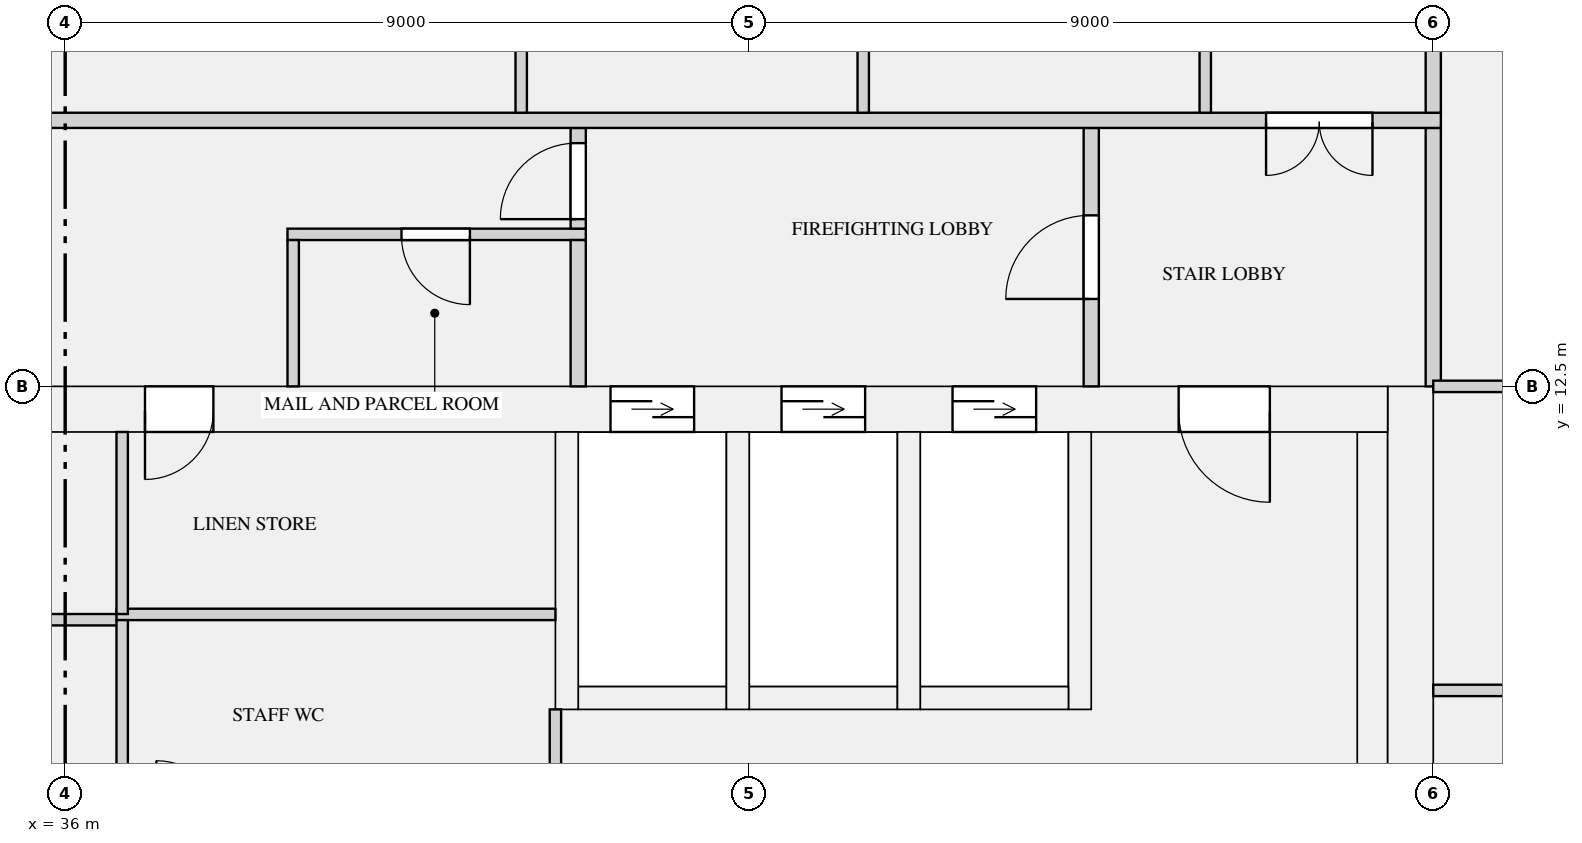
"""IFC4 building model, lengths in metres.
Left out: names, types, materials, properties, quantities, classifications, styles, units other than length and angle.
Written with IfcOpenShell. Run it as: python <this file> out.ifc"""

import sys

from ifc_helpers import new_model, si_unit, direction, frame, frame_2d, origin, place, context, subcontext, project, spatial, rectangle, extrude, element, fill, save


model = new_model("IFC4")
c1 = context("Model", 3, precision=1e-05, world=origin(), true_north=direction((0.0, 1.0)))
c2 = subcontext(c1, "Body", "Model", "MODEL_VIEW")
j1 = project(units=[si_unit("LENGTHUNIT", "METRE"), si_unit("PLANEANGLEUNIT", "RADIAN")], contexts=[c1])
p1 = place(None, origin())
s1 = spatial("IfcSite", under=j1, at=p1, CompositionType="ELEMENT")
p2 = place(p1, origin())
s2 = spatial("IfcBuilding", under=s1, at=p2, CompositionType="ELEMENT")
p3 = place(p2, frame((0.0, 0.0, 229.5)))
s3 = spatial("IfcBuildingStorey", under=s2, at=p3, CompositionType="ELEMENT", Elevation=229.5)
p4 = place(p3, frame((53.7, 0.0, 0.0), z_axis=(0.0, 0.0, 1.0), x_axis=(0.0, 1.0, 0.0)))
e1 = element("IfcWall", 1, at=p4, inside=s3, PredefinedType="SHEAR", context=c2, shape_type="SweptSolid", body=[
    extrude(rectangle(XDim=12.5, YDim=0.6, at=frame_2d((6.25, 0.0))), origin(), (0.0, 0.0, 1.0), 3.15),
])
p5 = place(p3, frame((18.6, 12.2, 0.0), z_axis=(0.0, 0.0, 1.0), x_axis=(1.0, 0.0, 0.0)))
e2 = element("IfcWall", 2, at=p5, inside=s3, PredefinedType="SHEAR", context=c2, shape_type="SweptSolid", body=[
    extrude(rectangle(XDim=34.8, YDim=0.6, at=frame_2d((17.4, 0.0))), origin(), (0.0, 0.0, 1.0), 3.15),
])
p6 = place(p5, frame((24.575, 0.0, 0.0)))
e3 = element("IfcOpeningElement", 3, at=p6, cuts=e2, PredefinedType="OPENING", context=c2, shape_type="SweptSolid", body=[
    extrude(rectangle(XDim=1.1, YDim=2.1, at=frame_2d((0.55, 1.05))), frame((0.0, 0.31, 0.0), z_axis=(0.0, -1.0, 0.0), x_axis=(1.0, 0.0, 0.0)), (0.0, 0.0, 1.0), 0.62),
])
p7 = place(p5, frame((26.825, 0.0, 0.0)))
e4 = element("IfcOpeningElement", 4, at=p7, cuts=e2, PredefinedType="OPENING", context=c2, shape_type="SweptSolid", body=[
    extrude(rectangle(XDim=1.1, YDim=2.1, at=frame_2d((0.55, 1.05))), frame((0.0, 0.31, 0.0), z_axis=(0.0, -1.0, 0.0), x_axis=(1.0, 0.0, 0.0)), (0.0, 0.0, 1.0), 0.62),
])
p8 = place(p5, frame((29.075, 0.0, 0.0)))
e5 = element("IfcOpeningElement", 5, at=p8, cuts=e2, PredefinedType="OPENING", context=c2, shape_type="SweptSolid", body=[
    extrude(rectangle(XDim=1.1, YDim=2.1, at=frame_2d((0.55, 1.05))), frame((0.0, 0.31, 0.0), z_axis=(0.0, -1.0, 0.0), x_axis=(1.0, 0.0, 0.0)), (0.0, 0.0, 1.0), 0.62),
])
p9 = place(p5, frame((4.95, 0.0, 0.0)))
e6 = element("IfcOpeningElement", 6, at=p9, cuts=e2, PredefinedType="OPENING", context=c2, shape_type="SweptSolid", body=[
    extrude(rectangle(XDim=0.9, YDim=2.1, at=frame_2d((0.45, 1.05))), frame((0.0, 0.31, 0.0), z_axis=(0.0, -1.0, 0.0), x_axis=(1.0, 0.0, 0.0)), (0.0, 0.0, 1.0), 0.62),
])
p10 = place(p5, frame((11.95, 0.0, 0.0)))
e7 = element("IfcOpeningElement", 7, at=p10, cuts=e2, PredefinedType="OPENING", context=c2, shape_type="SweptSolid", body=[
    extrude(rectangle(XDim=0.9, YDim=2.1, at=frame_2d((0.45, 1.05))), frame((0.0, 0.31, 0.0), z_axis=(0.0, -1.0, 0.0), x_axis=(1.0, 0.0, 0.0)), (0.0, 0.0, 1.0), 0.62),
])
p11 = place(p5, frame((18.45, 0.0, 0.0)))
e8 = element("IfcOpeningElement", 8, at=p11, cuts=e2, PredefinedType="OPENING", context=c2, shape_type="SweptSolid", body=[
    extrude(rectangle(XDim=0.9, YDim=2.1, at=frame_2d((0.45, 1.05))), frame((0.0, 0.31, 0.0), z_axis=(0.0, -1.0, 0.0), x_axis=(1.0, 0.0, 0.0)), (0.0, 0.0, 1.0), 0.62),
])
p12 = place(p5, frame((1.55, 0.0, 0.0)))
e9 = element("IfcOpeningElement", 9, at=p12, cuts=e2, PredefinedType="OPENING", context=c2, shape_type="SweptSolid", body=[
    extrude(rectangle(XDim=1.2, YDim=2.1, at=frame_2d((0.6, 1.05))), frame((0.0, 0.31, 0.0), z_axis=(0.0, -1.0, 0.0), x_axis=(1.0, 0.0, 0.0)), (0.0, 0.0, 1.0), 0.62),
])
p13 = place(p5, frame((32.05, 0.0, 0.0)))
e10 = element("IfcOpeningElement", 10, at=p13, cuts=e2, PredefinedType="OPENING", context=c2, shape_type="SweptSolid", body=[
    extrude(rectangle(XDim=1.2, YDim=2.1, at=frame_2d((0.6, 1.05))), frame((0.0, 0.31, 0.0), z_axis=(0.0, -1.0, 0.0), x_axis=(1.0, 0.0, 0.0)), (0.0, 0.0, 1.0), 0.62),
])
p14 = place(p3, frame((53.2, 1.0, 0.0), z_axis=(0.0, 0.0, 1.0), x_axis=(0.0, 1.0, 0.0)))
e11 = element("IfcWall", 11, at=p14, inside=s3, PredefinedType="SHEAR", context=c2, shape_type="SweptSolid", body=[
    extrude(rectangle(XDim=10.9, YDim=0.4, at=frame_2d((5.45, 0.0))), origin(), (0.0, 0.0, 1.0), 3.15),
])
p15 = place(p3, frame((42.75, 8.4, 0.0), z_axis=(0.0, 0.0, 1.0), x_axis=(1.0, 0.0, 0.0)))
e12 = element("IfcWall", 12, at=p15, inside=s3, PredefinedType="SHEAR", context=c2, shape_type="SweptSolid", body=[
    extrude(rectangle(XDim=1.95, YDim=0.3, at=frame_2d((0.975, 0.0))), origin(), (0.0, 0.0, 1.0), 3.15),
])
p16 = place(p3, frame((42.6, 8.25, 0.0), z_axis=(0.0, 0.0, 1.0), x_axis=(0.0, 1.0, 0.0)))
e13 = element("IfcWall", 13, at=p16, inside=s3, PredefinedType="SHEAR", context=c2, shape_type="SweptSolid", body=[
    extrude(rectangle(XDim=3.65, YDim=0.3, at=frame_2d((1.825, 0.0))), origin(), (0.0, 0.0, 1.0), 3.15),
])
p17 = place(p3, frame((45.0, 8.4, 0.0), z_axis=(0.0, 0.0, 1.0), x_axis=(1.0, 0.0, 0.0)))
e14 = element("IfcWall", 14, at=p17, inside=s3, PredefinedType="SHEAR", context=c2, shape_type="SweptSolid", body=[
    extrude(rectangle(XDim=1.95, YDim=0.3, at=frame_2d((0.975, 0.0))), origin(), (0.0, 0.0, 1.0), 3.15),
])
p18 = place(p3, frame((44.85, 8.25, 0.0), z_axis=(0.0, 0.0, 1.0), x_axis=(0.0, 1.0, 0.0)))
e15 = element("IfcWall", 15, at=p18, inside=s3, PredefinedType="SHEAR", context=c2, shape_type="SweptSolid", body=[
    extrude(rectangle(XDim=3.65, YDim=0.3, at=frame_2d((1.825, 0.0))), origin(), (0.0, 0.0, 1.0), 3.15),
])
p19 = place(p3, frame((47.25, 8.4, 0.0), z_axis=(0.0, 0.0, 1.0), x_axis=(1.0, 0.0, 0.0)))
e16 = element("IfcWall", 16, at=p19, inside=s3, PredefinedType="SHEAR", context=c2, shape_type="SweptSolid", body=[
    extrude(rectangle(XDim=1.95, YDim=0.3, at=frame_2d((0.975, 0.0))), origin(), (0.0, 0.0, 1.0), 3.15),
])
for number, where, z_axis, x_axis in (
    (17, (47.1, 8.25, 0.0), (0.0, 0.0, 1.0), (0.0, 1.0, 0.0)),
    (18, (49.35, 8.25, 0.0), (0.0, 0.0, 1.0), (0.0, 1.0, 0.0)),
):
    element("IfcWall", number, at=place(p3, frame(where, z_axis=z_axis, x_axis=x_axis)), inside=s3, PredefinedType="SHEAR", context=c2, shape_type="SweptSolid", body=[
        extrude(rectangle(XDim=3.65, YDim=0.3, at=frame_2d((1.825, 0.0))), origin(), (0.0, 0.0, 1.0), 3.15),
    ])
p20 = place(p3, frame((22.725, 9.43, 0.0), z_axis=(0.0, 0.0, 1.0), x_axis=(1.0, 0.0, 0.0)))
e19 = element("IfcWall", 19, at=p20, inside=s3, PredefinedType="PARTITIONING", context=c2, shape_type="SweptSolid", body=[
    extrude(rectangle(XDim=14.1, YDim=0.15, at=frame_2d((7.05, 0.0))), origin(), (0.0, 0.0, 1.0), 2.83),
])
p21 = place(p3, frame((36.675, 9.5, 0.0), z_axis=(0.0, 0.0, 1.0), x_axis=(1.0, 0.0, 0.0)))
e20 = element("IfcWall", 20, at=p21, inside=s3, PredefinedType="PARTITIONING", context=c2, shape_type="SweptSolid", body=[
    extrude(rectangle(XDim=5.775, YDim=0.15, at=frame_2d((2.887, 0.0))), origin(), (0.0, 0.0, 1.0), 2.83),
])
p22 = place(p3, frame((38.925, 14.5, 0.0), z_axis=(0.0, 0.0, 1.0), x_axis=(1.0, 0.0, 0.0)))
e21 = element("IfcWall", 21, at=p22, inside=s3, PredefinedType="PARTITIONING", context=c2, shape_type="SweptSolid", body=[
    extrude(rectangle(XDim=3.925, YDim=0.15, at=frame_2d((1.962, 0.0))), origin(), (0.0, 0.0, 1.0), 2.83),
])
p23 = place(p22, frame((1.5, 0.0, 0.0)))
e22 = element("IfcOpeningElement", 22, at=p23, cuts=e21, PredefinedType="OPENING", context=c2, shape_type="SweptSolid", body=[
    extrude(rectangle(XDim=0.9, YDim=2.1, at=frame_2d((0.45, 1.05))), frame((0.0, 0.085, 0.0), z_axis=(0.0, -1.0, 0.0), x_axis=(1.0, 0.0, 0.0)), (0.0, 0.0, 1.0), 0.17),
])
p24 = place(p3, frame((42.45, 6.65, 0.0), z_axis=(0.0, 0.0, 1.0), x_axis=(0.0, 1.0, 0.0)))
e23 = element("IfcWall", 23, at=p24, inside=s3, PredefinedType="PARTITIONING", context=c2, shape_type="SweptSolid", body=[
    extrude(rectangle(XDim=1.6, YDim=0.15, at=frame_2d((0.8, 0.0))), origin(), (0.0, 0.0, 1.0), 2.83),
])
p25 = place(p3, frame((36.75, 6.725, 0.0), z_axis=(0.0, 0.0, 1.0), x_axis=(0.0, 1.0, 0.0)))
e24 = element("IfcWall", 24, at=p25, inside=s3, PredefinedType="PARTITIONING", context=c2, shape_type="SweptSolid", body=[
    extrude(rectangle(XDim=2.7, YDim=0.15, at=frame_2d((1.35, 0.0))), origin(), (0.0, 0.0, 1.0), 2.83),
])
p26 = place(p3, frame((36.75, 9.505, 0.0), z_axis=(0.0, 0.0, 1.0), x_axis=(0.0, 1.0, 0.0)))
e25 = element("IfcWall", 25, at=p26, inside=s3, PredefinedType="PARTITIONING", context=c2, shape_type="SweptSolid", body=[
    extrude(rectangle(XDim=2.395, YDim=0.15, at=frame_2d((1.198, 0.0))), origin(), (0.0, 0.0, 1.0), 2.83),
])
p27 = place(p3, frame((39.0, 12.5, 0.0), z_axis=(0.0, 0.0, 1.0), x_axis=(0.0, 1.0, 0.0)))
e26 = element("IfcWall", 26, at=p27, inside=s3, PredefinedType="PARTITIONING", context=c2, shape_type="SweptSolid", body=[
    extrude(rectangle(XDim=1.925, YDim=0.15, at=frame_2d((0.962, 0.0))), origin(), (0.0, 0.0, 1.0), 2.83),
])
p28 = place(p3, frame((42.75, 12.5, 0.0), z_axis=(0.0, 0.0, 1.0), x_axis=(0.0, 1.0, 0.0)))
e27 = element("IfcWall", 27, at=p28, inside=s3, PredefinedType="PARTITIONING", context=c2, shape_type="SweptSolid", body=[
    extrude(rectangle(XDim=1.925, YDim=0.2, at=frame_2d((0.962, 0.0))), origin(), (0.0, 0.0, 1.0), 2.83),
])
p29 = place(p3, frame((49.5, 12.5, 0.0), z_axis=(0.0, 0.0, 1.0), x_axis=(0.0, 1.0, 0.0)))
e28 = element("IfcWall", 28, at=p29, inside=s3, PredefinedType="PARTITIONING", context=c2, shape_type="SweptSolid", body=[
    extrude(rectangle(XDim=3.4, YDim=0.2, at=frame_2d((1.7, 0.0))), origin(), (0.0, 0.0, 1.0), 2.83),
])
p30 = place(p29, frame((1.15, 0.0, 0.0)))
e29 = element("IfcOpeningElement", 29, at=p30, cuts=e28, PredefinedType="OPENING", context=c2, shape_type="SweptSolid", body=[
    extrude(rectangle(XDim=1.1, YDim=2.1, at=frame_2d((0.55, 1.05))), frame((0.0, 0.11, 0.0), z_axis=(0.0, -1.0, 0.0), x_axis=(1.0, 0.0, 0.0)), (0.0, 0.0, 1.0), 0.22),
])
p31 = place(p3, frame((54.0, 12.5, 0.0), z_axis=(0.0, 0.0, 1.0), x_axis=(0.0, 1.0, 0.0)))
e30 = element("IfcWall", 30, at=p31, inside=s3, PredefinedType="PARTITIONING", context=c2, shape_type="SweptSolid", body=[
    extrude(rectangle(XDim=3.4, YDim=0.2, at=frame_2d((1.7, 0.0))), origin(), (0.0, 0.0, 1.0), 2.83),
])
p32 = place(p3, frame((42.75, 14.575, 0.0), z_axis=(0.0, 0.0, 1.0), x_axis=(0.0, 1.0, 0.0)))
e31 = element("IfcWall", 31, at=p32, inside=s3, PredefinedType="PARTITIONING", context=c2, shape_type="SweptSolid", body=[
    extrude(rectangle(XDim=1.325, YDim=0.2, at=frame_2d((0.663, 0.0))), origin(), (0.0, 0.0, 1.0), 2.83),
])
p33 = place(p32, frame((0.125, 0.0, 0.0)))
e32 = element("IfcOpeningElement", 32, at=p33, cuts=e31, PredefinedType="OPENING", context=c2, shape_type="SweptSolid", body=[
    extrude(rectangle(XDim=1.0, YDim=2.1, at=frame_2d((0.5, 1.05))), frame((0.0, 0.11, 0.0), z_axis=(0.0, -1.0, 0.0), x_axis=(1.0, 0.0, 0.0)), (0.0, 0.0, 1.0), 0.22),
])
p34 = place(p3, frame((54.0, 12.5, 0.0), z_axis=(0.0, 0.0, 1.0), x_axis=(1.0, 0.0, 0.0)))
e33 = element("IfcWall", 33, at=p34, inside=s3, PredefinedType="PARTITIONING", context=c2, shape_type="SweptSolid", body=[
    extrude(rectangle(XDim=17.35, YDim=0.15, at=frame_2d((8.675, 0.0))), origin(), (0.0, 0.0, 1.0), 2.83),
])
p35 = place(p34, frame((1.5, 0.0, 0.0)))
e34 = element("IfcOpeningElement", 34, at=p35, cuts=e33, PredefinedType="OPENING", context=c2, shape_type="SweptSolid", body=[
    extrude(rectangle(XDim=1.5, YDim=2.1, at=frame_2d((0.75, 1.05))), frame((0.0, 0.085, 0.0), z_axis=(0.0, -1.0, 0.0), x_axis=(1.0, 0.0, 0.0)), (0.0, 0.0, 1.0), 0.17),
])
p36 = place(p34, frame((12.725, 0.0, 0.0)))
e35 = element("IfcOpeningElement", 35, at=p36, cuts=e33, PredefinedType="OPENING", context=c2, shape_type="SweptSolid", body=[
    extrude(rectangle(XDim=1.5, YDim=2.1, at=frame_2d((0.75, 1.05))), frame((0.0, 0.085, 0.0), z_axis=(0.0, -1.0, 0.0), x_axis=(1.0, 0.0, 0.0)), (0.0, 0.0, 1.0), 0.17),
])
p37 = place(p3, frame((54.0, 8.5, 0.0), z_axis=(0.0, 0.0, 1.0), x_axis=(1.0, 0.0, 0.0)))
e36 = element("IfcWall", 36, at=p37, inside=s3, PredefinedType="PARTITIONING", context=c2, shape_type="SweptSolid", body=[
    extrude(rectangle(XDim=17.35, YDim=0.15, at=frame_2d((8.675, 0.0))), origin(), (0.0, 0.0, 1.0), 2.83),
])
p38 = place(p37, frame((1.8, 0.0, 0.0)))
e37 = element("IfcOpeningElement", 37, at=p38, cuts=e36, PredefinedType="OPENING", context=c2, shape_type="SweptSolid", body=[
    extrude(rectangle(XDim=0.9, YDim=2.1, at=frame_2d((0.45, 1.05))), frame((0.0, 0.085, 0.0), z_axis=(0.0, -1.0, 0.0), x_axis=(1.0, 0.0, 0.0)), (0.0, 0.0, 1.0), 0.17),
])
p39 = place(p37, frame((6.3, 0.0, 0.0)))
e38 = element("IfcOpeningElement", 38, at=p39, cuts=e36, PredefinedType="OPENING", context=c2, shape_type="SweptSolid", body=[
    extrude(rectangle(XDim=0.9, YDim=2.1, at=frame_2d((0.45, 1.05))), frame((0.0, 0.085, 0.0), z_axis=(0.0, -1.0, 0.0), x_axis=(1.0, 0.0, 0.0)), (0.0, 0.0, 1.0), 0.17),
])
p40 = place(p37, frame((12.8, 0.0, 0.0)))
e39 = element("IfcOpeningElement", 39, at=p40, cuts=e36, PredefinedType="OPENING", context=c2, shape_type="SweptSolid", body=[
    extrude(rectangle(XDim=0.9, YDim=2.1, at=frame_2d((0.45, 1.05))), frame((0.0, 0.085, 0.0), z_axis=(0.0, -1.0, 0.0), x_axis=(1.0, 0.0, 0.0)), (0.0, 0.0, 1.0), 0.17),
])
p41 = place(p3, frame((17.9, 16.0, 0.0), z_axis=(0.0, 0.0, 1.0), x_axis=(1.0, 0.0, 0.0)))
e40 = element("IfcWall", 40, at=p41, inside=s3, PredefinedType="PARTITIONING", context=c2, shape_type="SweptSolid", body=[
    extrude(rectangle(XDim=36.2, YDim=0.2, at=frame_2d((18.1, 0.0))), origin(), (0.0, 0.0, 1.0), 2.83),
])
p42 = place(p41, frame((0.9, 0.0, 0.0)))
e41 = element("IfcOpeningElement", 41, at=p42, cuts=e40, PredefinedType="OPENING", context=c2, shape_type="SweptSolid", body=[
    extrude(rectangle(XDim=1.4, YDim=2.1, at=frame_2d((0.7, 1.05))), frame((0.0, 0.11, 0.0), z_axis=(0.0, -1.0, 0.0), x_axis=(1.0, 0.0, 0.0)), (0.0, 0.0, 1.0), 0.22),
])
p43 = place(p41, frame((33.9, 0.0, 0.0)))
e42 = element("IfcOpeningElement", 42, at=p43, cuts=e40, PredefinedType="OPENING", context=c2, shape_type="SweptSolid", body=[
    extrude(rectangle(XDim=1.4, YDim=2.1, at=frame_2d((0.7, 1.05))), frame((0.0, 0.11, 0.0), z_axis=(0.0, -1.0, 0.0), x_axis=(1.0, 0.0, 0.0)), (0.0, 0.0, 1.0), 0.22),
])
p44 = place(p3, frame((54.0, 16.1, 0.0), z_axis=(0.0, 0.0, 1.0), x_axis=(0.0, 1.0, 0.0)))
e43 = element("IfcWall", 43, at=p44, inside=s3, PredefinedType="PARTITIONING", context=c2, shape_type="SweptSolid", body=[
    extrude(rectangle(XDim=7.8, YDim=0.2, at=frame_2d((3.9, 0.0))), origin(), (0.0, 0.0, 1.0), 2.83),
])
p45 = place(p44, frame((1.85, 0.0, 0.0)))
e44 = element("IfcOpeningElement", 44, at=p45, cuts=e43, PredefinedType="OPENING", context=c2, shape_type="SweptSolid", body=[
    extrude(rectangle(XDim=1.1, YDim=2.1, at=frame_2d((0.55, 1.05))), frame((0.0, 0.11, 0.0), z_axis=(0.0, -1.0, 0.0), x_axis=(1.0, 0.0, 0.0)), (0.0, 0.0, 1.0), 0.22),
])
p46 = place(p3, frame((51.0, 16.1, 0.0), z_axis=(0.0, 0.0, 1.0), x_axis=(0.0, 1.0, 0.0)))
e45 = element("IfcWall", 45, at=p46, inside=s3, PredefinedType="PARTITIONING", context=c2, shape_type="SweptSolid", body=[
    extrude(rectangle(XDim=4.825, YDim=0.15, at=frame_2d((2.413, 0.0))), origin(), (0.0, 0.0, 1.0), 2.83),
])
p47 = place(p46, frame((1.95, 0.0, 0.0)))
e46 = element("IfcOpeningElement", 46, at=p47, cuts=e45, PredefinedType="OPENING", context=c2, shape_type="SweptSolid", body=[
    extrude(rectangle(XDim=0.9, YDim=2.1, at=frame_2d((0.45, 1.05))), frame((0.0, 0.085, 0.0), z_axis=(0.0, -1.0, 0.0), x_axis=(1.0, 0.0, 0.0)), (0.0, 0.0, 1.0), 0.17),
])
for number, where, z_axis, x_axis in (
    (47, (42.0, 16.1, 0.0), (0.0, 0.0, 1.0), (0.0, 1.0, 0.0)),
    (48, (46.5, 16.1, 0.0), (0.0, 0.0, 1.0), (0.0, 1.0, 0.0)),
):
    element("IfcWall", number, at=place(p3, frame(where, z_axis=z_axis, x_axis=x_axis)), inside=s3, PredefinedType="PARTITIONING", context=c2, shape_type="SweptSolid", body=[
        extrude(rectangle(XDim=4.825, YDim=0.15, at=frame_2d((2.413, 0.0))), origin(), (0.0, 0.0, 1.0), 2.83),
    ])
p48 = place(p6, origin())
e49 = element("IfcDoor", 49, at=p48, inside=s3, OperationType="DOUBLE_DOOR_SLIDING", PredefinedType="DOOR", context=c2, shape_type="SweptSolid", body=[
    extrude(rectangle(XDim=1.1, YDim=2.1, at=frame_2d((0.55, 1.05))), frame((0.0, 0.025, 0.0), z_axis=(0.0, -1.0, 0.0), x_axis=(1.0, 0.0, 0.0)), (0.0, 0.0, 1.0), 0.05),
])
fill(e3, e49)
p49 = place(p7, origin())
e50 = element("IfcDoor", 50, at=p49, inside=s3, OperationType="DOUBLE_DOOR_SLIDING", PredefinedType="DOOR", context=c2, shape_type="SweptSolid", body=[
    extrude(rectangle(XDim=1.1, YDim=2.1, at=frame_2d((0.55, 1.05))), frame((0.0, 0.025, 0.0), z_axis=(0.0, -1.0, 0.0), x_axis=(1.0, 0.0, 0.0)), (0.0, 0.0, 1.0), 0.05),
])
fill(e4, e50)
p50 = place(p8, origin())
e51 = element("IfcDoor", 51, at=p50, inside=s3, OperationType="DOUBLE_DOOR_SLIDING", PredefinedType="DOOR", context=c2, shape_type="SweptSolid", body=[
    extrude(rectangle(XDim=1.1, YDim=2.1, at=frame_2d((0.55, 1.05))), frame((0.0, 0.025, 0.0), z_axis=(0.0, -1.0, 0.0), x_axis=(1.0, 0.0, 0.0)), (0.0, 0.0, 1.0), 0.05),
])
fill(e5, e51)
p51 = place(p23, frame((0.9, 0.0, 0.0), z_axis=(0.0, 0.0, 1.0), x_axis=(-1.0, 0.0, 0.0)))
e52 = element("IfcDoor", 52, at=p51, inside=s3, OperationType="SINGLE_SWING_LEFT", PredefinedType="DOOR", context=c2, shape_type="SweptSolid", body=[
    extrude(rectangle(XDim=0.9, YDim=2.1, at=frame_2d((0.45, 1.05))), frame((0.0, 0.025, 0.0), z_axis=(0.0, -1.0, 0.0), x_axis=(1.0, 0.0, 0.0)), (0.0, 0.0, 1.0), 0.05),
])
fill(e22, e52)
p52 = place(p11, frame((0.9, 0.0, 0.0), z_axis=(0.0, 0.0, 1.0), x_axis=(-1.0, 0.0, 0.0)))
e53 = element("IfcDoor", 53, at=p52, inside=s3, OperationType="SINGLE_SWING_RIGHT", PredefinedType="DOOR", context=c2, shape_type="SweptSolid", body=[
    extrude(rectangle(XDim=0.9, YDim=2.1, at=frame_2d((0.45, 1.05))), frame((0.0, 0.025, 0.0), z_axis=(0.0, -1.0, 0.0), x_axis=(1.0, 0.0, 0.0)), (0.0, 0.0, 1.0), 0.05),
])
fill(e8, e53)
p53 = place(p13, frame((1.2, 0.0, 0.0), z_axis=(0.0, 0.0, 1.0), x_axis=(-1.0, 0.0, 0.0)))
e54 = element("IfcDoor", 54, at=p53, inside=s3, OperationType="SINGLE_SWING_LEFT", PredefinedType="DOOR", context=c2, shape_type="SweptSolid", body=[
    extrude(rectangle(XDim=1.2, YDim=2.1, at=frame_2d((0.6, 1.05))), frame((0.0, 0.025, 0.0), z_axis=(0.0, -1.0, 0.0), x_axis=(1.0, 0.0, 0.0)), (0.0, 0.0, 1.0), 0.05),
])
fill(e10, e54)
p54 = place(p33, origin())
e55 = element("IfcDoor", 55, at=p54, inside=s3, OperationType="SINGLE_SWING_LEFT", PredefinedType="DOOR", context=c2, shape_type="SweptSolid", body=[
    extrude(rectangle(XDim=1.0, YDim=2.1, at=frame_2d((0.5, 1.05))), frame((0.0, 0.025, 0.0), z_axis=(0.0, -1.0, 0.0), x_axis=(1.0, 0.0, 0.0)), (0.0, 0.0, 1.0), 0.05),
])
fill(e32, e55)
p55 = place(p30, origin())
e56 = element("IfcDoor", 56, at=p55, inside=s3, OperationType="SINGLE_SWING_LEFT", PredefinedType="DOOR", context=c2, shape_type="SweptSolid", body=[
    extrude(rectangle(XDim=1.1, YDim=2.1, at=frame_2d((0.55, 1.05))), frame((0.0, 0.025, 0.0), z_axis=(0.0, -1.0, 0.0), x_axis=(1.0, 0.0, 0.0)), (0.0, 0.0, 1.0), 0.05),
])
fill(e29, e56)
p56 = place(p43, frame((1.4, 0.0, 0.0), z_axis=(0.0, 0.0, 1.0), x_axis=(-1.0, 0.0, 0.0)))
e57 = element("IfcDoor", 57, at=p56, inside=s3, OperationType="DOUBLE_DOOR_SINGLE_SWING", PredefinedType="DOOR", context=c2, shape_type="SweptSolid", body=[
    extrude(rectangle(XDim=1.4, YDim=2.1, at=frame_2d((0.7, 1.05))), frame((0.0, 0.025, 0.0), z_axis=(0.0, -1.0, 0.0), x_axis=(1.0, 0.0, 0.0)), (0.0, 0.0, 1.0), 0.05),
])
fill(e42, e57)
save(model, sys.argv[1])
